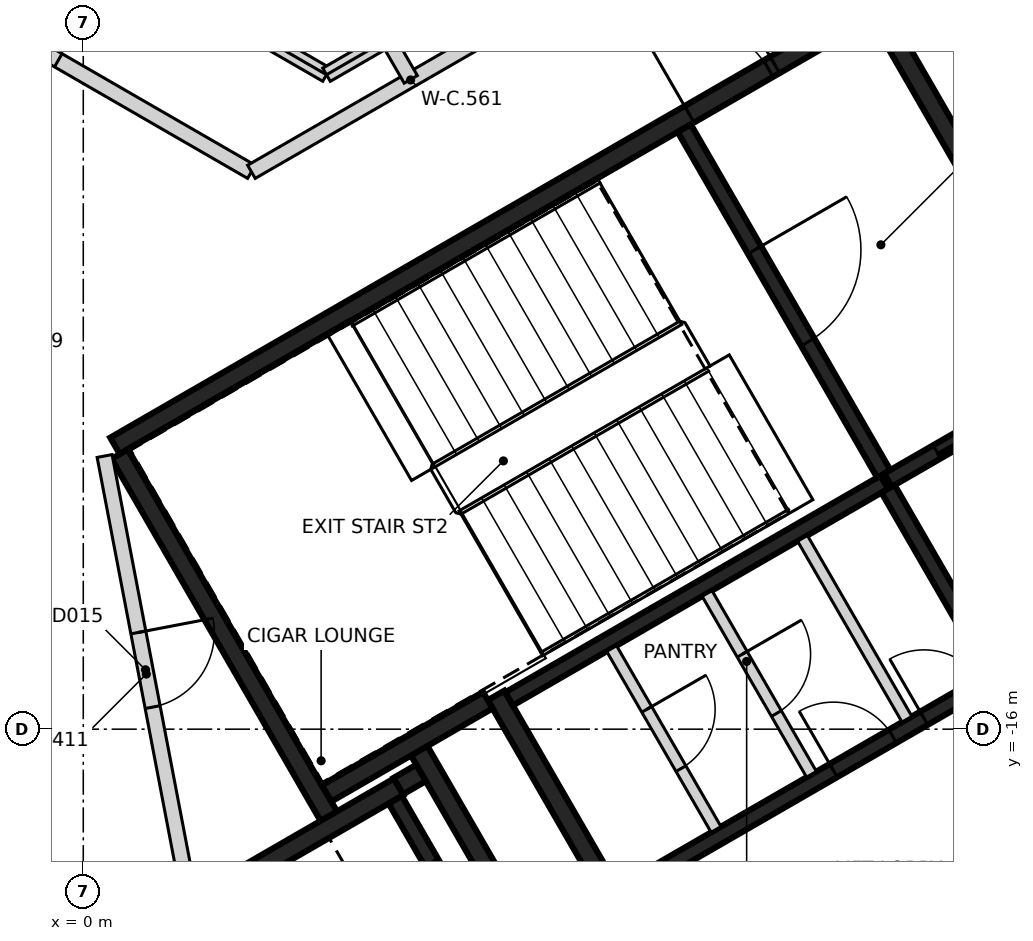
"""IFC4 building model, lengths in metres.
Left out: names, types, materials, properties, quantities, classifications, styles, units other than length and angle.
Written with IfcOpenShell. Run it as: python <this file> out.ifc"""

import sys

from ifc_helpers import new_model, si_unit, direction, frame, frame_2d, origin, place, context, subcontext, project, spatial, rectangle, extrude, element, fill, save


model = new_model("IFC4")
c1 = context("Model", 3, precision=1e-05, world=origin(), true_north=direction((0.0, 1.0)))
c2 = subcontext(c1, "Body", "Model", "MODEL_VIEW")
j1 = project(units=[si_unit("LENGTHUNIT", "METRE"), si_unit("PLANEANGLEUNIT", "RADIAN")], contexts=[c1])
p1 = place(None, origin())
s1 = spatial("IfcSite", under=j1, at=p1, CompositionType="ELEMENT")
p2 = place(p1, origin())
s2 = spatial("IfcBuilding", under=s1, at=p2, CompositionType="ELEMENT")
p3 = place(p2, frame((0.0, 0.0, 150.4)))
s3 = spatial("IfcBuildingStorey", under=s2, at=p3, CompositionType="ELEMENT", Elevation=150.4)
p4 = place(p3, frame((0.417, -12.273, 0.0), z_axis=(0.0, 0.0, 1.0), x_axis=(0.866021906294, 0.500006057782, 0.0)))
e1 = element("IfcWall", 1, at=p4, inside=s3, PredefinedType="SHEAR", context=c2, shape_type="SweptSolid", body=[
    extrude(rectangle(XDim=11.55, YDim=0.25, at=frame_2d((5.775, 0.0))), origin(), (0.0, 0.0, 1.0), 3.2),
])
p5 = place(p4, frame((10.025, 0.0, 0.0)))
e2 = element("IfcOpeningElement", 2, at=p5, cuts=e1, PredefinedType="OPENING", context=c2, shape_type="SweptSolid", body=[
    extrude(rectangle(XDim=1.2, YDim=2.1, at=frame_2d((0.6, 1.05))), frame((0.0, 0.135, 0.0), z_axis=(0.0, -1.0, 0.0), x_axis=(1.0, 0.0, 0.0)), (0.0, 0.0, 1.0), 0.27),
])
p6 = place(p4, frame((8.725, 0.0, 0.0)))
e3 = element("IfcOpeningElement", 3, at=p6, cuts=e1, PredefinedType="OPENING", context=c2, shape_type="SweptSolid", body=[
    extrude(rectangle(XDim=1.2, YDim=2.1, at=frame_2d((0.6, 1.05))), frame((0.0, 0.135, 0.0), z_axis=(0.0, -1.0, 0.0), x_axis=(1.0, 0.0, 0.0)), (0.0, 0.0, 1.0), 0.27),
])
p7 = place(p3, frame((3.235, -17.153, 0.0), z_axis=(0.0, 0.0, 1.0), x_axis=(-0.500008851346, 0.866020293397, 0.0)))
e4 = element("IfcWall", 4, at=p7, inside=s3, PredefinedType="SHEAR", context=c2, shape_type="SweptSolid", body=[
    extrude(rectangle(XDim=5.51, YDim=0.25, at=frame_2d((2.755, 0.0))), origin(), (0.0, 0.0, 1.0), 3.2),
])
p8 = place(p3, frame((10.483, -6.606, 0.0), z_axis=(0.0, 0.0, 1.0), x_axis=(0.49999885962, -0.866026062182, 0.0)))
e5 = element("IfcWall", 5, at=p8, inside=s3, PredefinedType="SHEAR", context=c2, shape_type="SweptSolid", body=[
    extrude(rectangle(XDim=5.225, YDim=0.25, at=frame_2d((2.612, 0.0))), origin(), (0.0, 0.0, 1.0), 3.2),
])
p9 = place(p3, frame((7.031, -18.327, 0.0), z_axis=(0.0, 0.0, 1.0), x_axis=(-0.499971222258, 0.866042017984, 0.0)))
e6 = element("IfcWall", 6, at=p9, inside=s3, PredefinedType="SHEAR", context=c2, shape_type="SweptSolid", body=[
    extrude(rectangle(XDim=3.2, YDim=0.25, at=frame_2d((1.6, 0.0))), origin(), (0.0, 0.0, 1.0), 3.2),
])
p10 = place(p3, frame((1.669, -18.19, 0.0), z_axis=(0.0, 0.0, 1.0), x_axis=(0.866042235819, 0.499970844928, 0.0)))
e7 = element("IfcWall", 7, at=p10, inside=s3, PredefinedType="SHEAR", context=c2, shape_type="SweptSolid", body=[
    extrude(rectangle(XDim=2.865, YDim=0.25, at=frame_2d((1.432, 0.0))), origin(), (0.0, 0.0, 1.0), 3.2),
])
p11 = place(p3, frame((4.414, -16.276, 0.0), z_axis=(0.0, 0.0, 1.0), x_axis=(0.500003324108, -0.866023484601, 0.0)))
e8 = element("IfcWall", 8, at=p11, inside=s3, PredefinedType="SHEAR", context=c2, shape_type="SweptSolid", body=[
    extrude(rectangle(XDim=3.085, YDim=0.25, at=frame_2d((1.542, 0.0))), origin(), (0.0, 0.0, 1.0), 3.2),
])
p12 = place(p3, frame((5.322, -15.619, 0.0), z_axis=(0.0, 0.0, 1.0), x_axis=(-0.866026229868, -0.499998569178, 0.0)))
e9 = element("IfcWall", 9, at=p12, inside=s3, PredefinedType="SHEAR", context=c2, shape_type="SweptSolid", body=[
    extrude(rectangle(XDim=2.449, YDim=0.25, at=frame_2d((1.225, 0.0))), origin(), (0.0, 0.0, 1.0), 3.2),
])
p13 = place(p3, frame((4.145, -16.749, 0.0), z_axis=(0.0, 0.0, 1.0), x_axis=(0.866185586049, 0.49972245349, 0.0)))
e10 = element("IfcWall", 10, at=p13, inside=s3, PredefinedType="SHEAR", context=c2, shape_type="SweptSolid", body=[
    extrude(rectangle(XDim=0.344, YDim=0.25, at=frame_2d((0.172, 0.0))), origin(), (0.0, 0.0, 1.0), 3.2),
])
p14 = place(p3, frame((9.052, -20.48, 0.0), z_axis=(0.0, 0.0, 1.0), x_axis=(0.866030299012, 0.499991521122, 0.0)))
e11 = element("IfcWall", 11, at=p14, inside=s3, PredefinedType="SHEAR", context=c2, shape_type="SweptSolid", body=[
    extrude(rectangle(XDim=6.1, YDim=0.2, at=frame_2d((3.05, 0.0))), origin(), (0.0, 0.0, 1.0), 3.2),
])
p15 = place(p14, frame((1.0, 0.0, 0.0)))
e12 = element("IfcOpeningElement", 12, at=p15, cuts=e11, PredefinedType="OPENING", context=c2, shape_type="SweptSolid", body=[
    extrude(rectangle(XDim=1.2, YDim=2.1, at=frame_2d((0.6, 1.05))), frame((0.0, 0.11, 0.0), z_axis=(0.0, -1.0, 0.0), x_axis=(1.0, 0.0, 0.0)), (0.0, 0.0, 1.0), 0.22),
])
p16 = place(p14, frame((4.05, 0.0, 0.0)))
e13 = element("IfcOpeningElement", 13, at=p16, cuts=e11, PredefinedType="OPENING", context=c2, shape_type="SweptSolid", body=[
    extrude(rectangle(XDim=1.2, YDim=2.1, at=frame_2d((0.6, 1.05))), frame((0.0, 0.11, 0.0), z_axis=(0.0, -1.0, 0.0), x_axis=(1.0, 0.0, 0.0)), (0.0, 0.0, 1.0), 0.22),
])
p17 = place(p3, frame((10.538, -12.752, 0.0), z_axis=(0.0, 0.0, 1.0), x_axis=(-0.866038630372, -0.499977090179, 0.0)))
e14 = element("IfcWall", 14, at=p17, inside=s3, PredefinedType="SHEAR", context=c2, shape_type="SweptSolid", body=[
    extrude(rectangle(XDim=5.699, YDim=0.2, at=frame_2d((2.85, 0.0))), origin(), (0.0, 0.0, 1.0), 3.2),
])
p18 = place(p3, frame((7.077, -18.156, 0.0), z_axis=(0.0, 0.0, 1.0), x_axis=(0.866038630372, 0.499977090179, 0.0)))
e15 = element("IfcWall", 15, at=p18, inside=s3, PredefinedType="SHEAR", context=c2, shape_type="SweptSolid", body=[
    extrude(rectangle(XDim=5.699, YDim=0.2, at=frame_2d((2.85, 0.0))), origin(), (0.0, 0.0, 1.0), 3.2),
])
p19 = place(p18, frame((3.224, 0.0, 0.0)))
e16 = element("IfcOpeningElement", 16, at=p19, cuts=e15, PredefinedType="OPENING", context=c2, shape_type="SweptSolid", body=[
    extrude(rectangle(XDim=0.9, YDim=2.1, at=frame_2d((0.45, 1.05))), frame((0.0, 0.11, 0.0), z_axis=(0.0, -1.0, 0.0), x_axis=(1.0, 0.0, 0.0)), (0.0, 0.0, 1.0), 0.22),
])
p20 = place(p18, frame((4.599, 0.0, 0.0)))
e17 = element("IfcOpeningElement", 17, at=p20, cuts=e15, PredefinedType="OPENING", context=c2, shape_type="SweptSolid", body=[
    extrude(rectangle(XDim=0.9, YDim=2.1, at=frame_2d((0.45, 1.05))), frame((0.0, 0.11, 0.0), z_axis=(0.0, -1.0, 0.0), x_axis=(1.0, 0.0, 0.0)), (0.0, 0.0, 1.0), 0.22),
])
p21 = place(p3, frame((7.906, -8.094, 0.0), z_axis=(0.0, 0.0, 1.0), x_axis=(0.500024287448, -0.866011380966, 0.0)))
e18 = element("IfcWall", 18, at=p21, inside=s3, PredefinedType="SHEAR", context=c2, shape_type="SweptSolid", body=[
    extrude(rectangle(XDim=5.251, YDim=0.2, at=frame_2d((2.625, 0.0))), origin(), (0.0, 0.0, 1.0), 3.2),
])
p22 = place(p21, frame((1.849, 0.0, 0.0)))
e19 = element("IfcOpeningElement", 19, at=p22, cuts=e18, PredefinedType="OPENING", context=c2, shape_type="SweptSolid", body=[
    extrude(rectangle(XDim=1.4, YDim=2.1, at=frame_2d((0.7, 1.05))), frame((0.0, 0.11, 0.0), z_axis=(0.0, -1.0, 0.0), x_axis=(1.0, 0.0, 0.0)), (0.0, 0.0, 1.0), 0.22),
])
p23 = place(p3, frame((5.503, -19.352, 0.0), z_axis=(0.0, 0.0, 1.0), x_axis=(-0.499986818241, 0.866033014143, 0.0)))
e20 = element("IfcWall", 20, at=p23, inside=s3, PredefinedType="SHEAR", context=c2, shape_type="SweptSolid", body=[
    extrude(rectangle(XDim=2.798, YDim=0.2, at=frame_2d((1.399, 0.0))), origin(), (0.0, 0.0, 1.0), 3.2),
])
p24 = place(p23, frame((0.949, 0.0, 0.0)))
e21 = element("IfcOpeningElement", 21, at=p24, cuts=e20, PredefinedType="OPENING", context=c2, shape_type="SweptSolid", body=[
    extrude(rectangle(XDim=0.9, YDim=2.1, at=frame_2d((0.45, 1.05))), frame((0.0, 0.11, 0.0), z_axis=(0.0, -1.0, 0.0), x_axis=(1.0, 0.0, 0.0)), (0.0, 0.0, 1.0), 0.22),
])
p25 = place(p3, frame((11.963, -15.22, 0.0), z_axis=(0.0, 0.0, 1.0), x_axis=(-0.500034990121, 0.866005201286, 0.0)))
e22 = element("IfcWall", 22, at=p25, inside=s3, PredefinedType="SHEAR", context=c2, shape_type="SweptSolid", body=[
    extrude(rectangle(XDim=2.75, YDim=0.2, at=frame_2d((1.375, 0.0))), origin(), (0.0, 0.0, 1.0), 3.2),
])
p26 = place(p3, frame((10.587, -12.723, 0.0), z_axis=(0.0, 0.0, 1.0), x_axis=(0.866037306777, 0.499979382845, 0.0)))
e23 = element("IfcWall", 23, at=p26, inside=s3, PredefinedType="SHEAR", context=c2, shape_type="SweptSolid", body=[
    extrude(rectangle(XDim=2.742, YDim=0.2, at=frame_2d((1.371, 0.0))), origin(), (0.0, 0.0, 1.0), 3.2),
])
p27 = place(p26, frame((0.743, 0.0, 0.0)))
e24 = element("IfcOpeningElement", 24, at=p27, cuts=e23, PredefinedType="OPENING", context=c2, shape_type="SweptSolid", body=[
    extrude(rectangle(XDim=1.3, YDim=2.1, at=frame_2d((0.65, 1.05))), frame((0.0, 0.11, 0.0), z_axis=(0.0, -1.0, 0.0), x_axis=(1.0, 0.0, 0.0)), (0.0, 0.0, 1.0), 0.22),
])
p28 = place(p3, frame((8.207, -14.214, 0.0), z_axis=(0.0, 0.0, 1.0), x_axis=(0.50002746344, -0.86600954718, 0.0)))
e25 = element("IfcWall", 25, at=p28, inside=s3, PredefinedType="PARTITIONING", context=c2, shape_type="SweptSolid", body=[
    extrude(rectangle(XDim=2.748, YDim=0.15, at=frame_2d((1.374, 0.0))), origin(), (0.0, 0.0, 1.0), 3.2),
])
p29 = place(p28, frame((0.924, 0.0, 0.0)))
e26 = element("IfcOpeningElement", 26, at=p29, cuts=e25, PredefinedType="OPENING", context=c2, shape_type="SweptSolid", body=[
    extrude(rectangle(XDim=0.9, YDim=2.1, at=frame_2d((0.45, 1.05))), frame((0.0, 0.085, 0.0), z_axis=(0.0, -1.0, 0.0), x_axis=(1.0, 0.0, 0.0)), (0.0, 0.0, 1.0), 0.17),
])
p30 = place(p3, frame((9.462, -13.489, 0.0), z_axis=(0.0, 0.0, 1.0), x_axis=(0.499988999718, -0.866031754707, 0.0)))
e27 = element("IfcWall", 27, at=p30, inside=s3, PredefinedType="PARTITIONING", context=c2, shape_type="SweptSolid", body=[
    extrude(rectangle(XDim=2.749, YDim=0.15, at=frame_2d((1.374, 0.0))), origin(), (0.0, 0.0, 1.0), 3.2),
])
p31 = place(p3, frame((6.951, -14.939, 0.0), z_axis=(0.0, 0.0, 1.0), x_axis=(0.499988999718, -0.866031754707, 0.0)))
e28 = element("IfcWall", 28, at=p31, inside=s3, PredefinedType="PARTITIONING", context=c2, shape_type="SweptSolid", body=[
    extrude(rectangle(XDim=2.749, YDim=0.15, at=frame_2d((1.374, 0.0))), origin(), (0.0, 0.0, 1.0), 3.2),
])
p32 = place(p31, frame((0.924, 0.0, 0.0)))
e29 = element("IfcOpeningElement", 29, at=p32, cuts=e28, PredefinedType="OPENING", context=c2, shape_type="SweptSolid", body=[
    extrude(rectangle(XDim=0.9, YDim=2.1, at=frame_2d((0.45, 1.05))), frame((0.0, 0.085, 0.0), z_axis=(0.0, -1.0, 0.0), x_axis=(1.0, 0.0, 0.0)), (0.0, 0.0, 1.0), 0.17),
])
p33 = place(p3, frame((-8.612, -2.418, 0.0), z_axis=(0.0, 0.0, 1.0), x_axis=(0.866023916678, -0.500002575735, 0.0)))
e30 = element("IfcWall", 30, at=p33, inside=s3, PredefinedType="PARTITIONING", context=c2, shape_type="SweptSolid", body=[
    extrude(rectangle(XDim=12.499, YDim=0.2, at=frame_2d((6.249, 0.0))), origin(), (0.0, 0.0, 1.0), 3.2),
])
p34 = place(p33, frame((2.427, 0.0, 0.0)))
e31 = element("IfcOpeningElement", 31, at=p34, cuts=e30, PredefinedType="OPENING", context=c2, shape_type="SweptSolid", body=[
    extrude(rectangle(XDim=0.9, YDim=2.1, at=frame_2d((0.45, 1.05))), frame((0.0, 0.11, 0.0), z_axis=(0.0, -1.0, 0.0), x_axis=(1.0, 0.0, 0.0)), (0.0, 0.0, 1.0), 0.22),
])
p35 = place(p33, frame((8.665, 0.0, 0.0)))
e32 = element("IfcOpeningElement", 32, at=p35, cuts=e30, PredefinedType="OPENING", context=c2, shape_type="SweptSolid", body=[
    extrude(rectangle(XDim=0.9, YDim=2.1, at=frame_2d((0.45, 1.05))), frame((0.0, 0.11, 0.0), z_axis=(0.0, -1.0, 0.0), x_axis=(1.0, 0.0, 0.0)), (0.0, 0.0, 1.0), 0.22),
])
p36 = place(p3, frame((0.281, -12.406, 0.0), z_axis=(0.0, 0.0, 1.0), x_axis=(0.187814940093, -0.982204433037, 0.0)))
e33 = element("IfcWall", 33, at=p36, inside=s3, PredefinedType="PARTITIONING", context=c2, shape_type="SweptSolid", body=[
    extrude(rectangle(XDim=5.842, YDim=0.2, at=frame_2d((2.921, 0.0))), origin(), (0.0, 0.0, 1.0), 3.2),
])
p37 = place(p36, frame((2.363, 0.0, 0.0)))
e34 = element("IfcOpeningElement", 34, at=p37, cuts=e33, PredefinedType="OPENING", context=c2, shape_type="SweptSolid", body=[
    extrude(rectangle(XDim=1.0, YDim=2.1, at=frame_2d((0.5, 1.05))), frame((0.0, 0.11, 0.0), z_axis=(0.0, -1.0, 0.0), x_axis=(1.0, 0.0, 0.0)), (0.0, 0.0, 1.0), 0.22),
])
p38 = place(p3, frame((2.212, -8.667, 0.0), z_axis=(0.0, 0.0, 1.0), x_axis=(0.866053587187, 0.499951181737, 0.0)))
e35 = element("IfcWall", 35, at=p38, inside=s3, PredefinedType="PARTITIONING", context=c2, shape_type="SweptSolid", body=[
    extrude(rectangle(XDim=4.835, YDim=0.2, at=frame_2d((2.418, 0.0))), origin(), (0.0, 0.0, 1.0), 2.3),
])
p39 = place(p3, frame((-8.0, -0.924, 0.0), z_axis=(0.0, 0.0, 1.0), x_axis=(0.866062358179, -0.499935987647, 0.0)))
e36 = element("IfcWall", 36, at=p39, inside=s3, PredefinedType="PARTITIONING", context=c2, shape_type="SweptSolid", body=[
    extrude(rectangle(XDim=12.932, YDim=0.2, at=frame_2d((6.466, 0.0))), origin(), (0.0, 0.0, 1.0), 2.3),
])
p40 = place(p3, frame((3.2, -7.39, 0.0), z_axis=(0.0, 0.0, 1.0), x_axis=(0.865875248522, 0.500259986404, 0.0)))
e37 = element("IfcWall", 37, at=p40, inside=s3, PredefinedType="PARTITIONING", context=c2, shape_type="SweptSolid", body=[
    extrude(rectangle(XDim=1.848, YDim=0.2, at=frame_2d((0.924, 0.0))), origin(), (0.0, 0.0, 1.0), 2.3),
])
p41 = place(p3, frame((4.005, -6.925, 0.0), z_axis=(0.0, 0.0, 1.0), x_axis=(0.499942781752, -0.866058436235, 0.0)))
e38 = element("IfcWall", 38, at=p41, inside=s3, PredefinedType="PARTITIONING", context=c2, shape_type="SweptSolid", body=[
    extrude(rectangle(XDim=0.607, YDim=0.2, at=frame_2d((0.304, 0.0))), origin(), (0.0, 0.0, 1.0), 2.3),
])
p42 = place(p27, origin())
e39 = element("IfcDoor", 39, at=p42, inside=s3, OperationType="SLIDING_TO_RIGHT", PredefinedType="DOOR", context=c2, shape_type="SweptSolid", body=[
    extrude(rectangle(XDim=1.3, YDim=2.1, at=frame_2d((0.65, 1.05))), frame((0.0, 0.025, 0.0), z_axis=(0.0, -1.0, 0.0), x_axis=(1.0, 0.0, 0.0)), (0.0, 0.0, 1.0), 0.05),
])
fill(e24, e39)
p43 = place(p5, origin())
e40 = element("IfcDoor", 40, at=p43, inside=s3, OperationType="SINGLE_SWING_LEFT", PredefinedType="DOOR", context=c2, shape_type="SweptSolid", body=[
    extrude(rectangle(XDim=1.2, YDim=2.1, at=frame_2d((0.6, 1.05))), frame((0.0, 0.025, 0.0), z_axis=(0.0, -1.0, 0.0), x_axis=(1.0, 0.0, 0.0)), (0.0, 0.0, 1.0), 0.05),
])
fill(e2, e40)
p44 = place(p6, origin())
e41 = element("IfcDoor", 41, at=p44, inside=s3, OperationType="SINGLE_SWING_RIGHT", PredefinedType="DOOR", context=c2, shape_type="SweptSolid", body=[
    extrude(rectangle(XDim=1.2, YDim=2.1, at=frame_2d((0.6, 1.05))), frame((0.0, 0.025, 0.0), z_axis=(0.0, -1.0, 0.0), x_axis=(1.0, 0.0, 0.0)), (0.0, 0.0, 1.0), 0.05),
])
fill(e3, e41)
p45 = place(p22, origin())
e42 = element("IfcDoor", 42, at=p45, inside=s3, OperationType="SINGLE_SWING_RIGHT", PredefinedType="DOOR", context=c2, shape_type="SweptSolid", body=[
    extrude(rectangle(XDim=1.4, YDim=2.1, at=frame_2d((0.7, 1.05))), frame((0.0, 0.025, 0.0), z_axis=(0.0, -1.0, 0.0), x_axis=(1.0, 0.0, 0.0)), (0.0, 0.0, 1.0), 0.05),
])
fill(e19, e42)
p46 = place(p19, origin())
e43 = element("IfcDoor", 43, at=p46, inside=s3, OperationType="SINGLE_SWING_LEFT", PredefinedType="DOOR", context=c2, shape_type="SweptSolid", body=[
    extrude(rectangle(XDim=0.9, YDim=2.1, at=frame_2d((0.45, 1.05))), frame((0.0, 0.025, 0.0), z_axis=(0.0, -1.0, 0.0), x_axis=(1.0, 0.0, 0.0)), (0.0, 0.0, 1.0), 0.05),
])
fill(e16, e43)
p47 = place(p20, origin())
e44 = element("IfcDoor", 44, at=p47, inside=s3, OperationType="SINGLE_SWING_RIGHT", PredefinedType="DOOR", context=c2, shape_type="SweptSolid", body=[
    extrude(rectangle(XDim=0.9, YDim=2.1, at=frame_2d((0.45, 1.05))), frame((0.0, 0.025, 0.0), z_axis=(0.0, -1.0, 0.0), x_axis=(1.0, 0.0, 0.0)), (0.0, 0.0, 1.0), 0.05),
])
fill(e17, e44)
p48 = place(p29, origin())
e45 = element("IfcDoor", 45, at=p48, inside=s3, OperationType="SINGLE_SWING_RIGHT", PredefinedType="DOOR", context=c2, shape_type="SweptSolid", body=[
    extrude(rectangle(XDim=0.9, YDim=2.1, at=frame_2d((0.45, 1.05))), frame((0.0, 0.025, 0.0), z_axis=(0.0, -1.0, 0.0), x_axis=(1.0, 0.0, 0.0)), (0.0, 0.0, 1.0), 0.05),
])
fill(e26, e45)
p49 = place(p32, origin())
e46 = element("IfcDoor", 46, at=p49, inside=s3, OperationType="SINGLE_SWING_LEFT", PredefinedType="DOOR", context=c2, shape_type="SweptSolid", body=[
    extrude(rectangle(XDim=0.9, YDim=2.1, at=frame_2d((0.45, 1.05))), frame((0.0, 0.025, 0.0), z_axis=(0.0, -1.0, 0.0), x_axis=(1.0, 0.0, 0.0)), (0.0, 0.0, 1.0), 0.05),
])
fill(e29, e46)
p50 = place(p37, origin())
e47 = element("IfcDoor", 47, at=p50, inside=s3, OperationType="SINGLE_SWING_LEFT", PredefinedType="DOOR", context=c2, shape_type="SweptSolid", body=[
    extrude(rectangle(XDim=1.0, YDim=2.1, at=frame_2d((0.5, 1.05))), frame((0.0, 0.025, 0.0), z_axis=(0.0, -1.0, 0.0), x_axis=(1.0, 0.0, 0.0)), (0.0, 0.0, 1.0), 0.05),
])
fill(e34, e47)
p51 = place(p35, origin())
e48 = element("IfcDoor", 48, at=p51, inside=s3, OperationType="SINGLE_SWING_LEFT", PredefinedType="DOOR", context=c2, shape_type="SweptSolid", body=[
    extrude(rectangle(XDim=0.9, YDim=2.1, at=frame_2d((0.45, 1.05))), frame((0.0, 0.025, 0.0), z_axis=(0.0, -1.0, 0.0), x_axis=(1.0, 0.0, 0.0)), (0.0, 0.0, 1.0), 0.05),
])
fill(e32, e48)
save(model, sys.argv[1])
